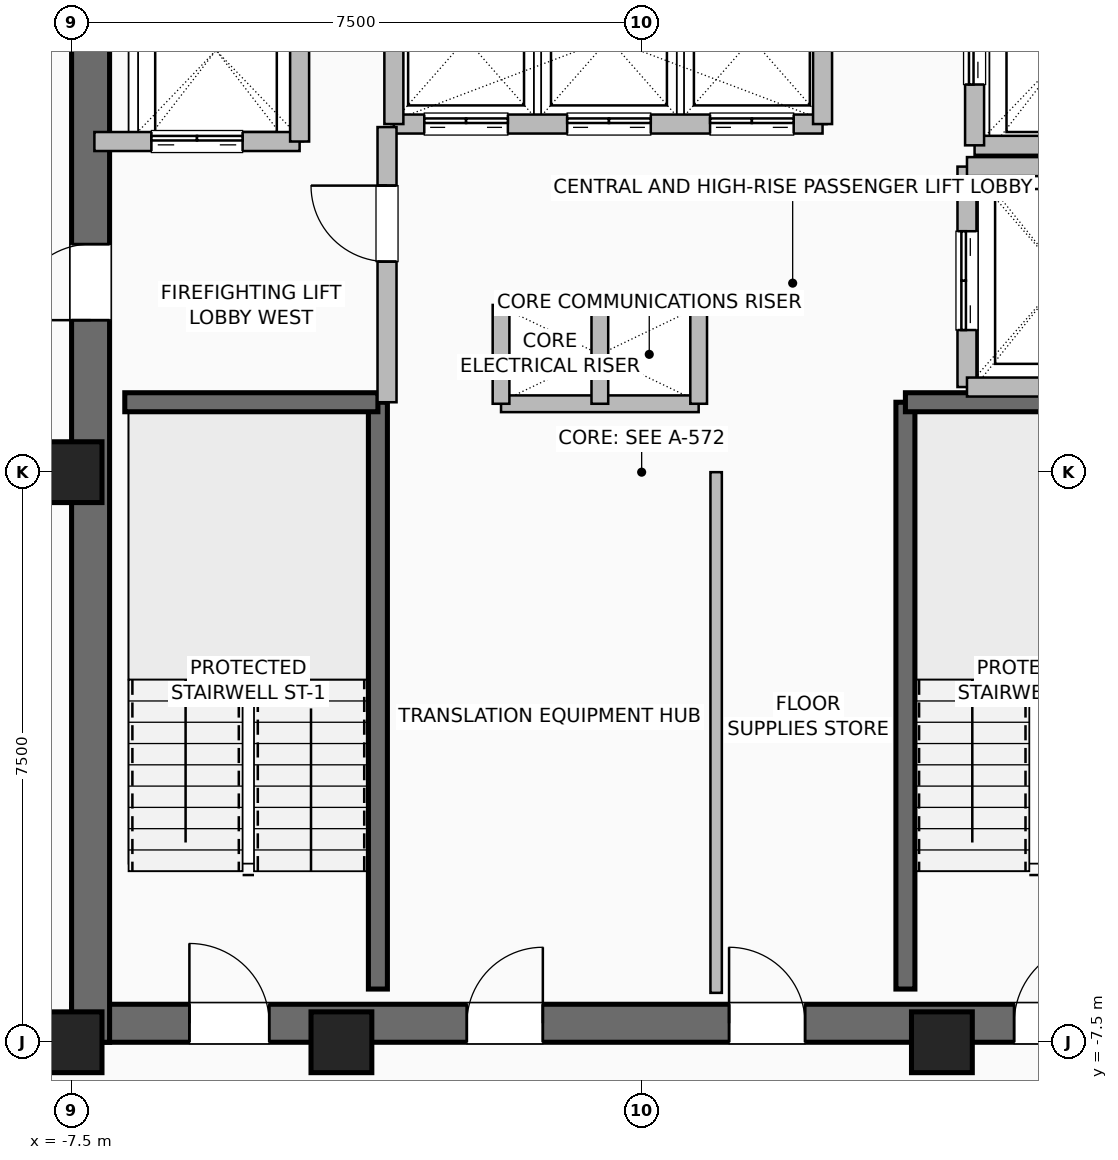
"""IFC4 building model, lengths in metres.
Left out: names, types, materials, properties, quantities, classifications, styles, units other than length and angle.
Written with IfcOpenShell. Run it as: python <this file> out.ifc"""

import sys

from ifc_helpers import new_model, si_unit, direction, frame, frame_2d, origin, origin_2d, place, context, subcontext, project, spatial, rectangle, hollow_rectangle, extrude, element, fill, save


model = new_model("IFC4")
c1 = context("Model", 3, precision=1e-05, world=origin(), true_north=direction((0.0, 1.0)))
c2 = subcontext(c1, "Body", "Model", "MODEL_VIEW")
j1 = project(units=[si_unit("LENGTHUNIT", "METRE"), si_unit("PLANEANGLEUNIT", "RADIAN")], contexts=[c1])
p1 = place(None, origin())
s1 = spatial("IfcSite", under=j1, at=p1, CompositionType="ELEMENT")
p2 = place(p1, origin())
s2 = spatial("IfcBuilding", under=s1, at=p2, CompositionType="ELEMENT")
p3 = place(p2, frame((0.0, 0.0, 286.4)))
s3 = spatial("IfcBuildingStorey", under=s2, at=p3, CompositionType="ELEMENT", Elevation=286.4)
for number, where, z_axis, x_axis in (
    (1, (-7.5, -7.5, 0.0), (0.0, 0.0, 1.0), (1.0, 0.0, 0.0)),
    (2, (-3.95, -7.5, 0.0), (0.0, 0.0, 1.0), (1.0, 0.0, 0.0)),
    (3, (3.95, -7.5, 0.0), (0.0, 0.0, 1.0), (1.0, 0.0, 0.0)),
    (4, (-7.5, 0.0, 0.0), (0.0, 0.0, 1.0), (1.0, 0.0, 0.0)),
):
    element("IfcColumn", number, at=place(p3, frame(where, z_axis=z_axis, x_axis=x_axis)), inside=s3, PredefinedType="COLUMN", context=c2, shape_type="SweptSolid", body=[
        extrude(hollow_rectangle(XDim=0.8, YDim=0.8, WallThickness=0.04, at=origin_2d()), origin(), (0.0, 0.0, 1.0), 3.6),
    ])
p4 = place(p3, frame((-7.5, -7.25, 0.0), z_axis=(0.0, 0.0, 1.0), x_axis=(1.0, 0.0, 0.0)))
e5 = element("IfcWall", 5, at=p4, inside=s3, PredefinedType="SHEAR", context=c2, shape_type="SweptSolid", body=[
    extrude(rectangle(XDim=15.0, YDim=0.5, at=frame_2d((7.5, 0.0))), origin(), (0.0, 0.0, 1.0), 3.36),
])
p5 = place(p4, frame((1.55, 0.0, 0.0)))
e6 = element("IfcOpeningElement", 6, at=p5, cuts=e5, PredefinedType="OPENING", context=c2, shape_type="SweptSolid", body=[
    extrude(rectangle(XDim=1.05, YDim=2.08, at=frame_2d((0.525, 1.04))), frame((0.0, 0.26, 0.0), z_axis=(0.0, -1.0, 0.0), x_axis=(1.0, 0.0, 0.0)), (0.0, 0.0, 1.0), 0.52),
])
p6 = place(p4, frame((12.4, 0.0, 0.0)))
e7 = element("IfcOpeningElement", 7, at=p6, cuts=e5, PredefinedType="OPENING", context=c2, shape_type="SweptSolid", body=[
    extrude(rectangle(XDim=1.05, YDim=2.08, at=frame_2d((0.525, 1.04))), frame((0.0, 0.26, 0.0), z_axis=(0.0, -1.0, 0.0), x_axis=(1.0, 0.0, 0.0)), (0.0, 0.0, 1.0), 0.52),
])
p7 = place(p4, frame((5.2, 0.0, 0.0)))
e8 = element("IfcOpeningElement", 8, at=p7, cuts=e5, PredefinedType="OPENING", context=c2, shape_type="SweptSolid", body=[
    extrude(rectangle(XDim=1.0, YDim=2.08, at=frame_2d((0.5, 1.04))), frame((0.0, 0.26, 0.0), z_axis=(0.0, -1.0, 0.0), x_axis=(1.0, 0.0, 0.0)), (0.0, 0.0, 1.0), 0.52),
])
p8 = place(p4, frame((8.65, 0.0, 0.0)))
e9 = element("IfcOpeningElement", 9, at=p8, cuts=e5, PredefinedType="OPENING", context=c2, shape_type="SweptSolid", body=[
    extrude(rectangle(XDim=1.0, YDim=2.08, at=frame_2d((0.5, 1.04))), frame((0.0, 0.26, 0.0), z_axis=(0.0, -1.0, 0.0), x_axis=(1.0, 0.0, 0.0)), (0.0, 0.0, 1.0), 0.52),
])
p9 = place(p3, frame((-7.25, -7.5, 0.0), z_axis=(0.0, 0.0, 1.0), x_axis=(0.0, 1.0, 0.0)))
e10 = element("IfcWall", 10, at=p9, inside=s3, PredefinedType="SHEAR", context=c2, shape_type="SweptSolid", body=[
    extrude(rectangle(XDim=15.0, YDim=0.5, at=frame_2d((7.5, 0.0))), origin(), (0.0, 0.0, 1.0), 3.36),
])
p10 = place(p9, frame((9.5, 0.0, 0.0)))
e11 = element("IfcOpeningElement", 11, at=p10, cuts=e10, PredefinedType="OPENING", context=c2, shape_type="SweptSolid", body=[
    extrude(rectangle(XDim=1.0, YDim=2.08, at=frame_2d((0.5, 1.04))), frame((0.0, 0.26, 0.0), z_axis=(0.0, -1.0, 0.0), x_axis=(1.0, 0.0, 0.0)), (0.0, 0.0, 1.0), 0.52),
])
p11 = place(p3, frame((-3.47, -6.8, 0.0), z_axis=(0.0, 0.0, 1.0), x_axis=(0.0, 1.0, 0.0)))
e12 = element("IfcWall", 12, at=p11, inside=s3, PredefinedType="SHEAR", context=c2, shape_type="SweptSolid", body=[
    extrude(rectangle(XDim=7.72, YDim=0.25, at=frame_2d((3.86, 0.0))), origin(), (0.0, 0.0, 1.0), 3.36),
])
p12 = place(p3, frame((-6.8, 0.92, 0.0), z_axis=(0.0, 0.0, 1.0), x_axis=(1.0, 0.0, 0.0)))
e13 = element("IfcWall", 13, at=p12, inside=s3, PredefinedType="SHEAR", context=c2, shape_type="SweptSolid", body=[
    extrude(rectangle(XDim=3.33, YDim=0.25, at=frame_2d((1.665, 0.0))), origin(), (0.0, 0.0, 1.0), 3.36),
])
p13 = place(p3, frame((3.47, -6.8, 0.0), z_axis=(0.0, 0.0, 1.0), x_axis=(0.0, 1.0, 0.0)))
e14 = element("IfcWall", 14, at=p13, inside=s3, PredefinedType="SHEAR", context=c2, shape_type="SweptSolid", body=[
    extrude(rectangle(XDim=7.72, YDim=0.25, at=frame_2d((3.86, 0.0))), origin(), (0.0, 0.0, 1.0), 3.36),
])
p14 = place(p3, frame((3.47, 0.92, 0.0), z_axis=(0.0, 0.0, 1.0), x_axis=(1.0, 0.0, 0.0)))
e15 = element("IfcWall", 15, at=p14, inside=s3, PredefinedType="SHEAR", context=c2, shape_type="SweptSolid", body=[
    extrude(rectangle(XDim=3.33, YDim=0.25, at=frame_2d((1.665, 0.0))), origin(), (0.0, 0.0, 1.0), 3.36),
])
for number, where, z_axis, x_axis in (
    (16, (-1.85, 2.2, 0.0), (0.0, 0.0, 1.0), (1.0, 0.0, 0.0)),
    (17, (-1.85, 0.9, 0.0), (0.0, 0.0, 1.0), (1.0, 0.0, 0.0)),
):
    element("IfcWall", number, at=place(p3, frame(where, z_axis=z_axis, x_axis=x_axis)), inside=s3, PredefinedType="PARTITIONING", context=c2, shape_type="SweptSolid", body=[
        extrude(rectangle(XDim=2.6, YDim=0.22, at=frame_2d((1.3, 0.0))), origin(), (0.0, 0.0, 1.0), 3.36),
    ])
for number, where, z_axis, x_axis in (
    (18, (-0.55, 0.9, 0.0), (0.0, 0.0, 1.0), (0.0, 1.0, 0.0)),
    (19, (0.75, 0.9, 0.0), (0.0, 0.0, 1.0), (0.0, 1.0, 0.0)),
    (20, (-1.85, 0.9, 0.0), (0.0, 0.0, 1.0), (0.0, 1.0, 0.0)),
):
    element("IfcWall", number, at=place(p3, frame(where, z_axis=z_axis, x_axis=x_axis)), inside=s3, PredefinedType="PARTITIONING", context=c2, shape_type="SweptSolid", body=[
        extrude(rectangle(XDim=1.3, YDim=0.22, at=frame_2d((0.65, 0.0))), origin(), (0.0, 0.0, 1.0), 3.36),
    ])
p15 = place(p3, frame((-3.26, 4.58, 0.0), z_axis=(0.0, 0.0, 1.0), x_axis=(1.0, 0.0, 0.0)))
e21 = element("IfcWall", 21, at=p15, inside=s3, PredefinedType="SHEAR", context=c2, shape_type="SweptSolid", body=[
    extrude(rectangle(XDim=5.64, YDim=0.25, at=frame_2d((2.82, 0.0))), origin(), (0.0, 0.0, 1.0), 3.36),
])
p16 = place(p15, frame((0.4, 0.0, 0.0)))
e22 = element("IfcOpeningElement", 22, at=p16, cuts=e21, PredefinedType="OPENING", context=c2, shape_type="SweptSolid", body=[
    extrude(rectangle(XDim=1.1, YDim=2.2, at=frame_2d((0.55, 1.1))), frame((0.0, 0.135, 0.0), z_axis=(0.0, -1.0, 0.0), x_axis=(1.0, 0.0, 0.0)), (0.0, 0.0, 1.0), 0.27),
])
p17 = place(p15, frame((2.28, 0.0, 0.0)))
e23 = element("IfcOpeningElement", 23, at=p17, cuts=e21, PredefinedType="OPENING", context=c2, shape_type="SweptSolid", body=[
    extrude(rectangle(XDim=1.1, YDim=2.2, at=frame_2d((0.55, 1.1))), frame((0.0, 0.135, 0.0), z_axis=(0.0, -1.0, 0.0), x_axis=(1.0, 0.0, 0.0)), (0.0, 0.0, 1.0), 0.27),
])
p18 = place(p15, frame((4.16, 0.0, 0.0)))
e24 = element("IfcOpeningElement", 24, at=p18, cuts=e21, PredefinedType="OPENING", context=c2, shape_type="SweptSolid", body=[
    extrude(rectangle(XDim=1.1, YDim=2.2, at=frame_2d((0.55, 1.1))), frame((0.0, 0.135, 0.0), z_axis=(0.0, -1.0, 0.0), x_axis=(1.0, 0.0, 0.0)), (0.0, 0.0, 1.0), 0.27),
])
for number, where, z_axis, x_axis in (
    (25, (-3.26, 4.58, 0.0), (0.0, 0.0, 1.0), (0.0, 1.0, 0.0)),
    (26, (2.38, 4.58, 0.0), (0.0, 0.0, 1.0), (0.0, 1.0, 0.0)),
):
    element("IfcWall", number, at=place(p3, frame(where, z_axis=z_axis, x_axis=x_axis)), inside=s3, PredefinedType="SHEAR", context=c2, shape_type="SweptSolid", body=[
        extrude(rectangle(XDim=2.22, YDim=0.25, at=frame_2d((1.11, 0.0))), origin(), (0.0, 0.0, 1.0), 3.36),
    ])
p19 = place(p3, frame((-7.2, 4.35, 0.0), z_axis=(0.0, 0.0, 1.0), x_axis=(1.0, 0.0, 0.0)))
e27 = element("IfcWall", 27, at=p19, inside=s3, PredefinedType="SHEAR", context=c2, shape_type="SweptSolid", body=[
    extrude(rectangle(XDim=2.7, YDim=0.25, at=frame_2d((1.35, 0.0))), origin(), (0.0, 0.0, 1.0), 3.36),
])
p20 = place(p19, frame((0.75, 0.0, 0.0)))
e28 = element("IfcOpeningElement", 28, at=p20, cuts=e27, PredefinedType="OPENING", context=c2, shape_type="SweptSolid", body=[
    extrude(rectangle(XDim=1.2, YDim=2.2, at=frame_2d((0.6, 1.1))), frame((0.0, 0.135, 0.0), z_axis=(0.0, -1.0, 0.0), x_axis=(1.0, 0.0, 0.0)), (0.0, 0.0, 1.0), 0.27),
])
p21 = place(p3, frame((-4.5, 4.35, 0.0), z_axis=(0.0, 0.0, 1.0), x_axis=(0.0, 1.0, 0.0)))
e29 = element("IfcWall", 29, at=p21, inside=s3, PredefinedType="SHEAR", context=c2, shape_type="SweptSolid", body=[
    extrude(rectangle(XDim=2.85, YDim=0.25, at=frame_2d((1.425, 0.0))), origin(), (0.0, 0.0, 1.0), 3.36),
])
p22 = place(p3, frame((4.38, 4.3, 0.0), z_axis=(0.0, 0.0, 1.0), x_axis=(1.0, 0.0, 0.0)))
e30 = element("IfcWall", 30, at=p22, inside=s3, PredefinedType="SHEAR", context=c2, shape_type="SweptSolid", body=[
    extrude(rectangle(XDim=2.42, YDim=0.25, at=frame_2d((1.21, 0.0))), origin(), (0.0, 0.0, 1.0), 3.36),
])
p23 = place(p3, frame((4.38, 4.3, 0.0), z_axis=(0.0, 0.0, 1.0), x_axis=(0.0, 1.0, 0.0)))
e31 = element("IfcWall", 31, at=p23, inside=s3, PredefinedType="SHEAR", context=c2, shape_type="SweptSolid", body=[
    extrude(rectangle(XDim=2.5, YDim=0.25, at=frame_2d((1.25, 0.0))), origin(), (0.0, 0.0, 1.0), 3.36),
])
p24 = place(p23, frame((0.8, 0.0, 0.0)))
e32 = element("IfcOpeningElement", 32, at=p24, cuts=e31, PredefinedType="OPENING", context=c2, shape_type="SweptSolid", body=[
    extrude(rectangle(XDim=1.2, YDim=2.2, at=frame_2d((0.6, 1.1))), frame((0.0, 0.135, 0.0), z_axis=(0.0, -1.0, 0.0), x_axis=(1.0, 0.0, 0.0)), (0.0, 0.0, 1.0), 0.27),
])
p25 = place(p3, frame((4.28, 1.12, 0.0), z_axis=(0.0, 0.0, 1.0), x_axis=(0.0, 1.0, 0.0)))
e33 = element("IfcWall", 33, at=p25, inside=s3, PredefinedType="SHEAR", context=c2, shape_type="SweptSolid", body=[
    extrude(rectangle(XDim=2.9, YDim=0.25, at=frame_2d((1.45, 0.0))), origin(), (0.0, 0.0, 1.0), 3.36),
])
p26 = place(p25, frame((0.75, 0.0, 0.0)))
e34 = element("IfcOpeningElement", 34, at=p26, cuts=e33, PredefinedType="OPENING", context=c2, shape_type="SweptSolid", body=[
    extrude(rectangle(XDim=1.3, YDim=2.3, at=frame_2d((0.65, 1.15))), frame((0.0, 0.135, 0.0), z_axis=(0.0, -1.0, 0.0), x_axis=(1.0, 0.0, 0.0)), (0.0, 0.0, 1.0), 0.27),
])
for number, where, z_axis, x_axis in (
    (35, (4.28, 1.12, 0.0), (0.0, 0.0, 1.0), (1.0, 0.0, 0.0)),
    (36, (4.28, 4.02, 0.0), (0.0, 0.0, 1.0), (1.0, 0.0, 0.0)),
):
    element("IfcWall", number, at=place(p3, frame(where, z_axis=z_axis, x_axis=x_axis)), inside=s3, PredefinedType="SHEAR", context=c2, shape_type="SweptSolid", body=[
        extrude(rectangle(XDim=2.52, YDim=0.25, at=frame_2d((1.26, 0.0))), origin(), (0.0, 0.0, 1.0), 3.36),
    ])
p27 = place(p3, frame((-3.35, 0.92, 0.0), z_axis=(0.0, 0.0, 1.0), x_axis=(0.0, 1.0, 0.0)))
e37 = element("IfcWall", 37, at=p27, inside=s3, PredefinedType="SHEAR", context=c2, shape_type="SweptSolid", body=[
    extrude(rectangle(XDim=3.62, YDim=0.25, at=frame_2d((1.81, 0.0))), origin(), (0.0, 0.0, 1.0), 3.36),
])
p28 = place(p27, frame((1.85, 0.0, 0.0)))
e38 = element("IfcOpeningElement", 38, at=p28, cuts=e37, PredefinedType="OPENING", context=c2, shape_type="SweptSolid", body=[
    extrude(rectangle(XDim=1.0, YDim=2.08, at=frame_2d((0.5, 1.04))), frame((0.0, 0.135, 0.0), z_axis=(0.0, -1.0, 0.0), x_axis=(1.0, 0.0, 0.0)), (0.0, 0.0, 1.0), 0.27),
])
p29 = place(p3, frame((0.98, -6.85, 0.0), z_axis=(0.0, 0.0, 1.0), x_axis=(0.0, 1.0, 0.0)))
e39 = element("IfcWall", 39, at=p29, inside=s3, PredefinedType="PARTITIONING", context=c2, shape_type="SweptSolid", body=[
    extrude(rectangle(XDim=6.85, YDim=0.15, at=frame_2d((3.425, 0.0))), origin(), (0.0, 0.0, 1.0), 3.36),
])
p30 = place(p5, origin())
e40 = element("IfcDoor", 40, at=p30, inside=s3, OperationType="SINGLE_SWING_LEFT", PredefinedType="DOOR", context=c2, shape_type="SweptSolid", body=[
    extrude(rectangle(XDim=1.05, YDim=2.08, at=frame_2d((0.525, 1.04))), frame((0.0, 0.025, 0.0), z_axis=(0.0, -1.0, 0.0), x_axis=(1.0, 0.0, 0.0)), (0.0, 0.0, 1.0), 0.05),
])
fill(e6, e40)
p31 = place(p6, origin())
e41 = element("IfcDoor", 41, at=p31, inside=s3, OperationType="SINGLE_SWING_RIGHT", PredefinedType="DOOR", context=c2, shape_type="SweptSolid", body=[
    extrude(rectangle(XDim=1.05, YDim=2.08, at=frame_2d((0.525, 1.04))), frame((0.0, 0.025, 0.0), z_axis=(0.0, -1.0, 0.0), x_axis=(1.0, 0.0, 0.0)), (0.0, 0.0, 1.0), 0.05),
])
fill(e7, e41)
p32 = place(p10, origin())
e42 = element("IfcDoor", 42, at=p32, inside=s3, OperationType="SINGLE_SWING_LEFT", PredefinedType="DOOR", context=c2, shape_type="SweptSolid", body=[
    extrude(rectangle(XDim=1.0, YDim=2.08, at=frame_2d((0.5, 1.04))), frame((0.0, 0.025, 0.0), z_axis=(0.0, -1.0, 0.0), x_axis=(1.0, 0.0, 0.0)), (0.0, 0.0, 1.0), 0.05),
])
fill(e11, e42)
p33 = place(p7, origin())
e43 = element("IfcDoor", 43, at=p33, inside=s3, OperationType="SINGLE_SWING_RIGHT", PredefinedType="DOOR", context=c2, shape_type="SweptSolid", body=[
    extrude(rectangle(XDim=1.0, YDim=2.08, at=frame_2d((0.5, 1.04))), frame((0.0, 0.025, 0.0), z_axis=(0.0, -1.0, 0.0), x_axis=(1.0, 0.0, 0.0)), (0.0, 0.0, 1.0), 0.05),
])
fill(e8, e43)
p34 = place(p8, origin())
e44 = element("IfcDoor", 44, at=p34, inside=s3, OperationType="SINGLE_SWING_LEFT", PredefinedType="DOOR", context=c2, shape_type="SweptSolid", body=[
    extrude(rectangle(XDim=1.0, YDim=2.08, at=frame_2d((0.5, 1.04))), frame((0.0, 0.025, 0.0), z_axis=(0.0, -1.0, 0.0), x_axis=(1.0, 0.0, 0.0)), (0.0, 0.0, 1.0), 0.05),
])
fill(e9, e44)
p35 = place(p16, origin())
e45 = element("IfcDoor", 45, at=p35, inside=s3, OperationType="DOUBLE_DOOR_SLIDING", PredefinedType="DOOR", context=c2, shape_type="SweptSolid", body=[
    extrude(rectangle(XDim=1.1, YDim=2.2, at=frame_2d((0.55, 1.1))), frame((0.0, 0.025, 0.0), z_axis=(0.0, -1.0, 0.0), x_axis=(1.0, 0.0, 0.0)), (0.0, 0.0, 1.0), 0.05),
])
fill(e22, e45)
p36 = place(p17, origin())
e46 = element("IfcDoor", 46, at=p36, inside=s3, OperationType="DOUBLE_DOOR_SLIDING", PredefinedType="DOOR", context=c2, shape_type="SweptSolid", body=[
    extrude(rectangle(XDim=1.1, YDim=2.2, at=frame_2d((0.55, 1.1))), frame((0.0, 0.025, 0.0), z_axis=(0.0, -1.0, 0.0), x_axis=(1.0, 0.0, 0.0)), (0.0, 0.0, 1.0), 0.05),
])
fill(e23, e46)
p37 = place(p18, origin())
e47 = element("IfcDoor", 47, at=p37, inside=s3, OperationType="DOUBLE_DOOR_SLIDING", PredefinedType="DOOR", context=c2, shape_type="SweptSolid", body=[
    extrude(rectangle(XDim=1.1, YDim=2.2, at=frame_2d((0.55, 1.1))), frame((0.0, 0.025, 0.0), z_axis=(0.0, -1.0, 0.0), x_axis=(1.0, 0.0, 0.0)), (0.0, 0.0, 1.0), 0.05),
])
fill(e24, e47)
p38 = place(p20, origin())
e48 = element("IfcDoor", 48, at=p38, inside=s3, OperationType="DOUBLE_DOOR_SLIDING", PredefinedType="DOOR", context=c2, shape_type="SweptSolid", body=[
    extrude(rectangle(XDim=1.2, YDim=2.2, at=frame_2d((0.6, 1.1))), frame((0.0, 0.025, 0.0), z_axis=(0.0, -1.0, 0.0), x_axis=(1.0, 0.0, 0.0)), (0.0, 0.0, 1.0), 0.05),
])
fill(e28, e48)
p39 = place(p24, origin())
e49 = element("IfcDoor", 49, at=p39, inside=s3, OperationType="DOUBLE_DOOR_SLIDING", PredefinedType="DOOR", context=c2, shape_type="SweptSolid", body=[
    extrude(rectangle(XDim=1.2, YDim=2.2, at=frame_2d((0.6, 1.1))), frame((0.0, 0.025, 0.0), z_axis=(0.0, -1.0, 0.0), x_axis=(1.0, 0.0, 0.0)), (0.0, 0.0, 1.0), 0.05),
])
fill(e32, e49)
p40 = place(p26, origin())
e50 = element("IfcDoor", 50, at=p40, inside=s3, OperationType="DOUBLE_DOOR_SLIDING", PredefinedType="DOOR", context=c2, shape_type="SweptSolid", body=[
    extrude(rectangle(XDim=1.3, YDim=2.3, at=frame_2d((0.65, 1.15))), frame((0.0, 0.025, 0.0), z_axis=(0.0, -1.0, 0.0), x_axis=(1.0, 0.0, 0.0)), (0.0, 0.0, 1.0), 0.05),
])
fill(e34, e50)
p41 = place(p28, origin())
e51 = element("IfcDoor", 51, at=p41, inside=s3, OperationType="SINGLE_SWING_RIGHT", PredefinedType="DOOR", context=c2, shape_type="SweptSolid", body=[
    extrude(rectangle(XDim=1.0, YDim=2.08, at=frame_2d((0.5, 1.04))), frame((0.0, 0.025, 0.0), z_axis=(0.0, -1.0, 0.0), x_axis=(1.0, 0.0, 0.0)), (0.0, 0.0, 1.0), 0.05),
])
fill(e38, e51)
save(model, sys.argv[1])
